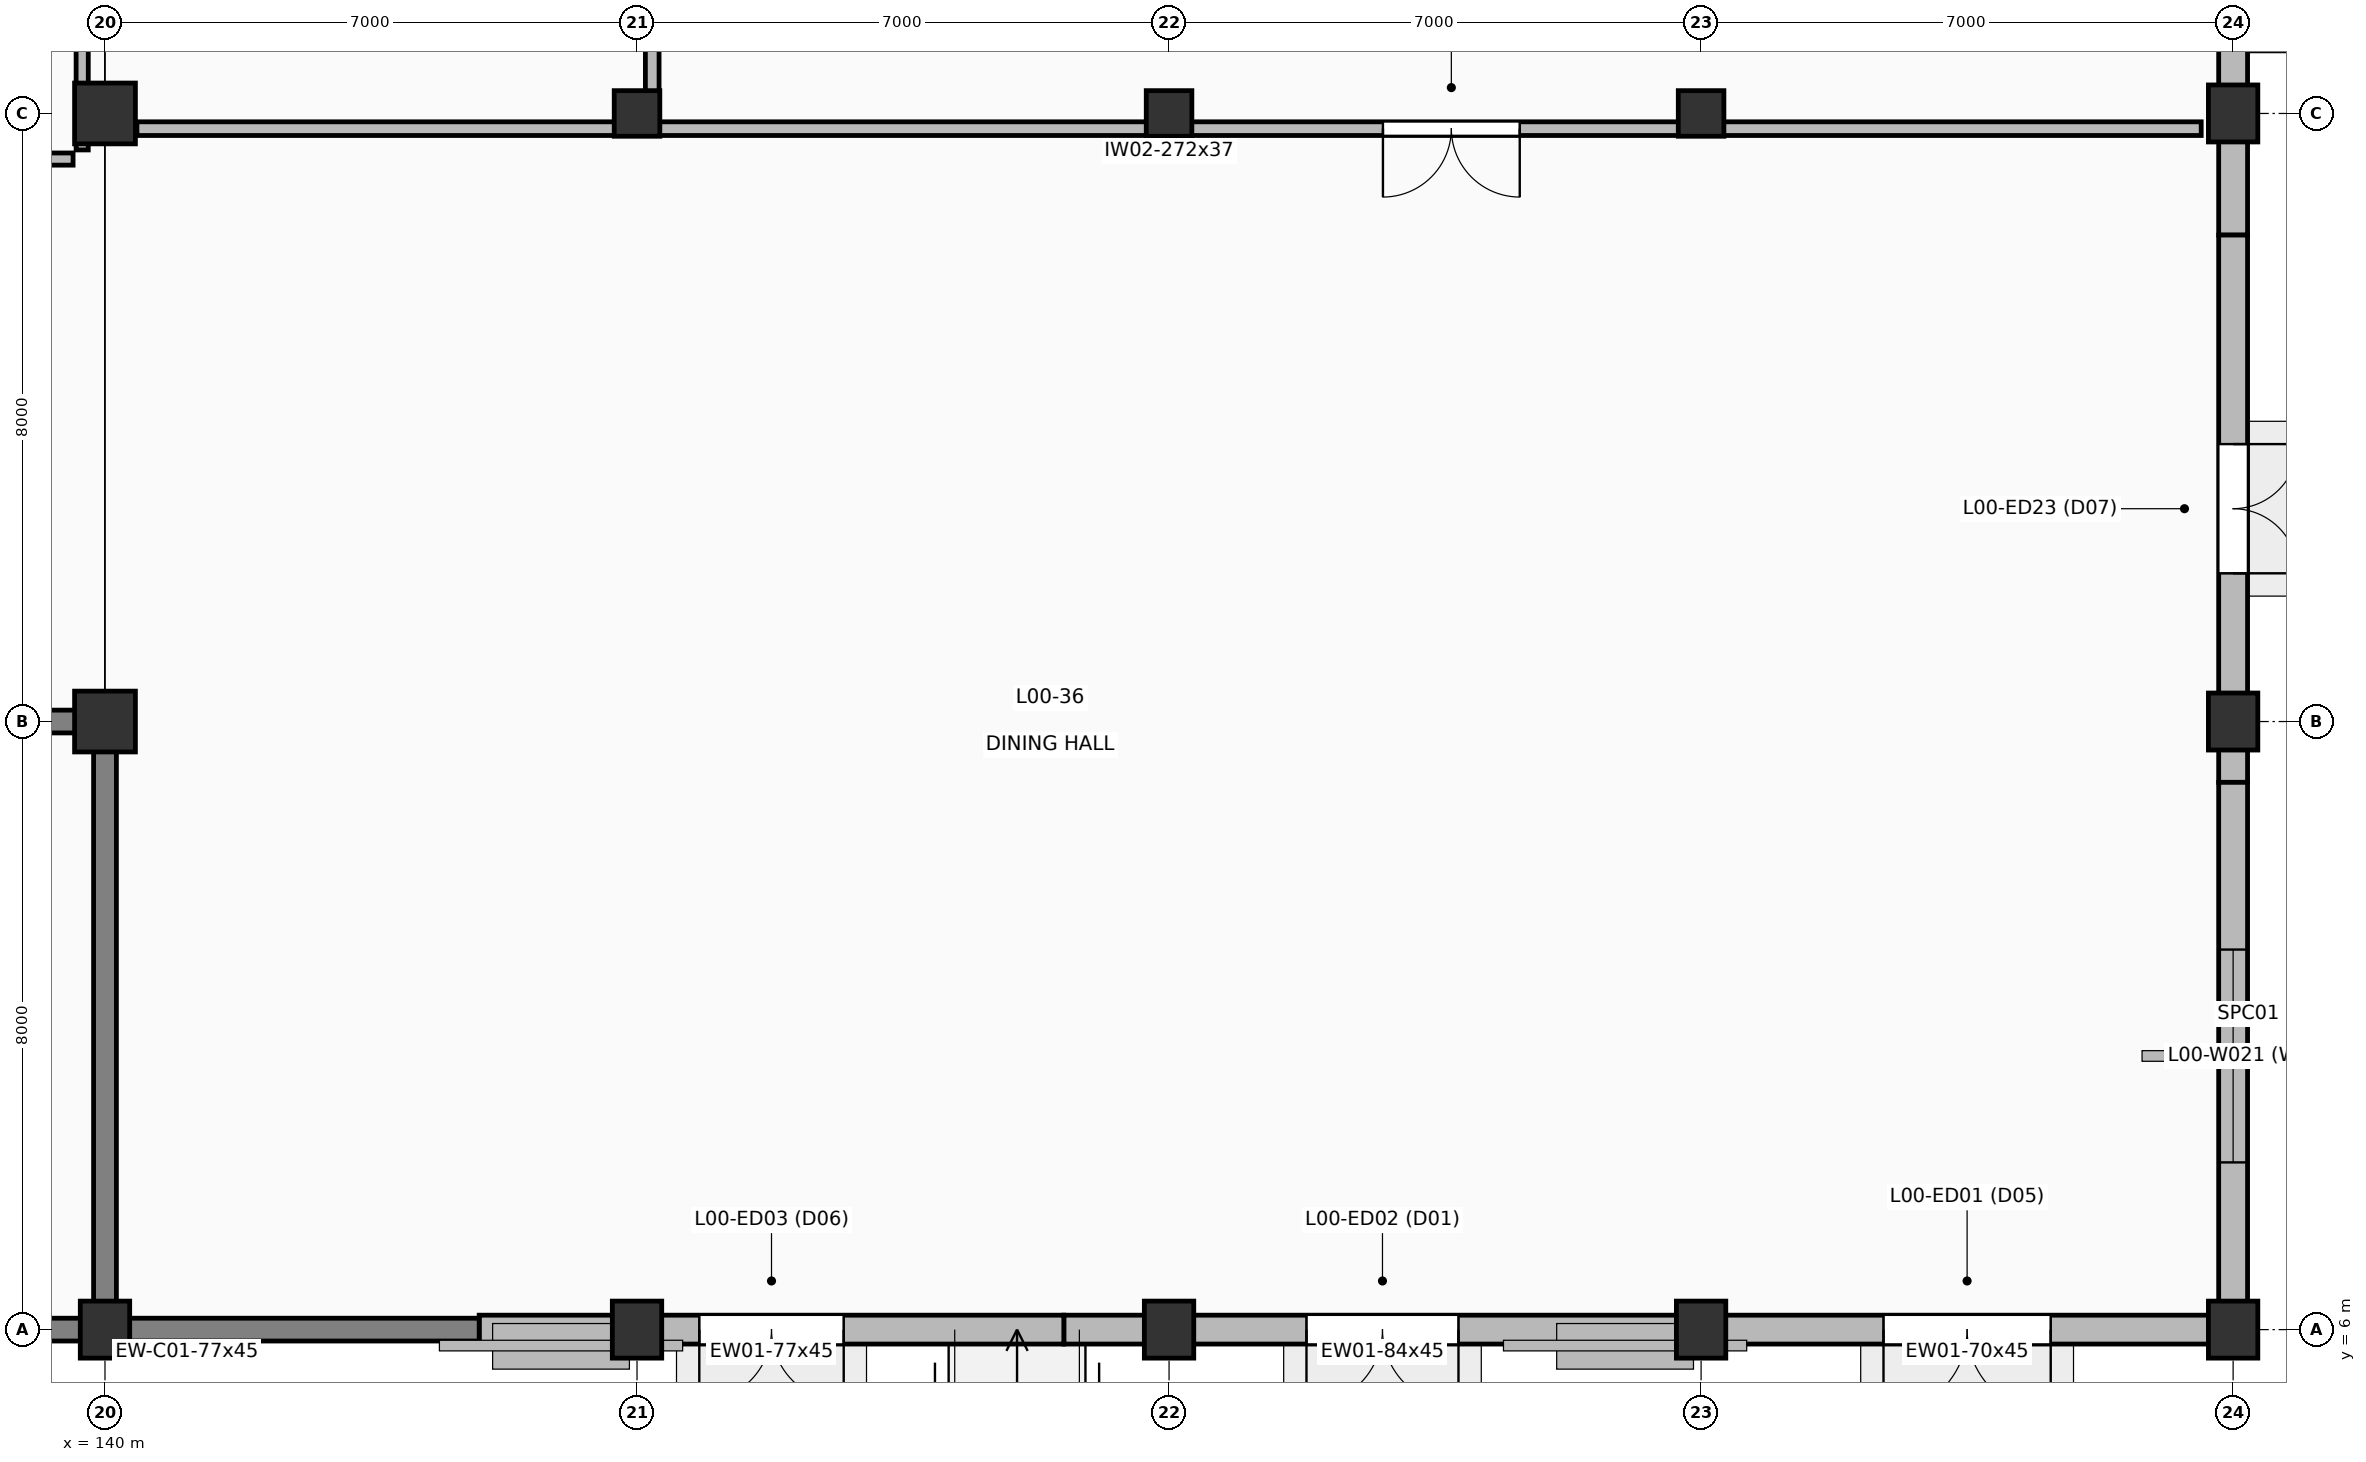
"""IFC4 building model, lengths in metres.
Left out: names, types, materials, properties, quantities, classifications, styles, units other than length and angle.
Written with IfcOpenShell. Run it as: python <this file> out.ifc"""

import sys

from ifc_helpers import new_model, si_unit, direction, frame, frame_2d, origin, origin_2d, place, context, subcontext, project, spatial, rectangle, extrude, element, fill, save


model = new_model("IFC4")
c1 = context("Model", 3, precision=1e-05, world=origin(), true_north=direction((0.0, 1.0)))
c2 = subcontext(c1, "Body", "Model", "MODEL_VIEW")
j1 = project(units=[si_unit("LENGTHUNIT", "METRE"), si_unit("PLANEANGLEUNIT", "RADIAN")], contexts=[c1])
p1 = place(None, origin())
s1 = spatial("IfcSite", under=j1, at=p1, CompositionType="ELEMENT")
p2 = place(p1, origin())
s2 = spatial("IfcBuilding", under=s1, at=p2, CompositionType="ELEMENT")
p3 = place(p2, origin())
s3 = spatial("IfcBuildingStorey", under=s2, at=p3, CompositionType="ELEMENT", Elevation=0.0)
p4 = place(p3, frame((140.0, 6.0, 0.0), z_axis=(0.0, 0.0, 1.0), x_axis=(1.0, 0.0, 0.0)))
e1 = element("IfcColumn", 1, at=p4, inside=s3, PredefinedType="PILASTER", context=c2, shape_type="SweptSolid", body=[
    extrude(rectangle(XDim=0.65, YDim=0.75, at=origin_2d()), origin(), (0.0, 0.0, 1.0), 5.4),
])
for number, where, z_axis, x_axis in (
    (2, (140.0, 14.0, 0.0), (0.0, 0.0, 1.0), (1.0, 0.0, 0.0)),
    (3, (140.0, 22.0, 0.0), (0.0, 0.0, 1.0), (1.0, 0.0, 0.0)),
):
    element("IfcColumn", number, at=place(p3, frame(where, z_axis=z_axis, x_axis=x_axis)), inside=s3, PredefinedType="COLUMN", context=c2, shape_type="SweptSolid", body=[
        extrude(rectangle(XDim=0.8, YDim=0.8, at=origin_2d()), origin(), (0.0, 0.0, 1.0), 5.4),
    ])
p5 = place(p3, frame((147.0, 6.0, 0.0), z_axis=(0.0, 0.0, 1.0), x_axis=(1.0, 0.0, 0.0)))
e4 = element("IfcColumn", 4, at=p5, inside=s3, PredefinedType="PILASTER", context=c2, shape_type="SweptSolid", body=[
    extrude(rectangle(XDim=0.65, YDim=0.75, at=origin_2d()), origin(), (0.0, 0.0, 1.0), 5.4),
])
p6 = place(p3, frame((147.0, 22.0, 0.0), z_axis=(0.0, 0.0, 1.0), x_axis=(1.0, 0.0, 0.0)))
e5 = element("IfcColumn", 5, at=p6, inside=s3, PredefinedType="COLUMN", context=c2, shape_type="SweptSolid", body=[
    extrude(rectangle(XDim=0.6, YDim=0.6, at=origin_2d()), origin(), (0.0, 0.0, 1.0), 5.4),
])
p7 = place(p3, frame((154.0, 6.0, 0.0), z_axis=(0.0, 0.0, 1.0), x_axis=(1.0, 0.0, 0.0)))
e6 = element("IfcColumn", 6, at=p7, inside=s3, PredefinedType="PILASTER", context=c2, shape_type="SweptSolid", body=[
    extrude(rectangle(XDim=0.65, YDim=0.75, at=origin_2d()), origin(), (0.0, 0.0, 1.0), 5.4),
])
p8 = place(p3, frame((154.0, 22.0, 0.0), z_axis=(0.0, 0.0, 1.0), x_axis=(1.0, 0.0, 0.0)))
e7 = element("IfcColumn", 7, at=p8, inside=s3, PredefinedType="COLUMN", context=c2, shape_type="SweptSolid", body=[
    extrude(rectangle(XDim=0.6, YDim=0.6, at=origin_2d()), origin(), (0.0, 0.0, 1.0), 5.4),
])
p9 = place(p3, frame((161.0, 6.0, 0.0), z_axis=(0.0, 0.0, 1.0), x_axis=(1.0, 0.0, 0.0)))
e8 = element("IfcColumn", 8, at=p9, inside=s3, PredefinedType="PILASTER", context=c2, shape_type="SweptSolid", body=[
    extrude(rectangle(XDim=0.65, YDim=0.75, at=origin_2d()), origin(), (0.0, 0.0, 1.0), 5.4),
])
p10 = place(p3, frame((161.0, 22.0, 0.0), z_axis=(0.0, 0.0, 1.0), x_axis=(1.0, 0.0, 0.0)))
e9 = element("IfcColumn", 9, at=p10, inside=s3, PredefinedType="COLUMN", context=c2, shape_type="SweptSolid", body=[
    extrude(rectangle(XDim=0.6, YDim=0.6, at=origin_2d()), origin(), (0.0, 0.0, 1.0), 5.4),
])
for number, where, z_axis, x_axis in (
    (10, (168.0, 6.0, 0.0), (0.0, 0.0, 1.0), (1.0, 0.0, 0.0)),
    (11, (168.0, 14.0, 0.0), (0.0, 0.0, 1.0), (1.0, 0.0, 0.0)),
    (12, (168.0, 22.0, 0.0), (0.0, 0.0, 1.0), (1.0, 0.0, 0.0)),
):
    element("IfcColumn", number, at=place(p3, frame(where, z_axis=z_axis, x_axis=x_axis)), inside=s3, PredefinedType="PILASTER", context=c2, shape_type="SweptSolid", body=[
        extrude(rectangle(XDim=0.65, YDim=0.75, at=origin_2d()), origin(), (0.0, 0.0, 1.0), 5.4),
    ])
p11 = place(p3, frame((168.0, 6.0, 0.0), z_axis=(0.0, 0.0, 1.0), x_axis=(-1.0, 0.0, 0.0)))
e13 = element("IfcWall", 13, at=p11, inside=s3, PredefinedType="SOLIDWALL", context=c2, shape_type="SweptSolid", body=[
    extrude(rectangle(XDim=7.0, YDim=0.38, at=frame_2d((3.5, 0.0))), origin(), (0.0, 0.0, 1.0), 4.495),
])
p12 = place(p11, frame((2.4, 0.0, 0.0)))
e14 = element("IfcOpeningElement", 14, at=p12, cuts=e13, PredefinedType="OPENING", context=c2, shape_type="SweptSolid", body=[
    extrude(rectangle(XDim=2.2, YDim=2.45, at=frame_2d((1.1, 1.225))), frame((0.0, 0.2, 0.0), z_axis=(0.0, -1.0, 0.0), x_axis=(1.0, 0.0, 0.0)), (0.0, 0.0, 1.0), 0.4),
])
p13 = place(p3, frame((161.0, 6.0, 0.0), z_axis=(0.0, 0.0, 1.0), x_axis=(-1.0, 0.0, 0.0)))
e15 = element("IfcWall", 15, at=p13, inside=s3, PredefinedType="SOLIDWALL", context=c2, shape_type="SweptSolid", body=[
    extrude(rectangle(XDim=8.385, YDim=0.38, at=frame_2d((4.192, 0.0))), origin(), (0.0, 0.0, 1.0), 4.495),
])
p14 = place(p13, frame((3.192, 0.0, 0.0)))
e16 = element("IfcOpeningElement", 16, at=p14, cuts=e15, PredefinedType="OPENING", context=c2, shape_type="SweptSolid", body=[
    extrude(rectangle(XDim=2.0, YDim=2.4, at=frame_2d((1.0, 1.2))), frame((0.0, 0.2, 0.0), z_axis=(0.0, -1.0, 0.0), x_axis=(1.0, 0.0, 0.0)), (0.0, 0.0, 1.0), 0.4),
])
p15 = place(p3, frame((152.615, 6.0, 0.0), z_axis=(0.0, 0.0, 1.0), x_axis=(-1.0, 0.0, 0.0)))
e17 = element("IfcWall", 17, at=p15, inside=s3, PredefinedType="SOLIDWALL", context=c2, shape_type="SweptSolid", body=[
    extrude(rectangle(XDim=7.692, YDim=0.38, at=frame_2d((3.846, 0.0))), origin(), (0.0, 0.0, 1.0), 4.495),
])
p16 = place(p15, frame((2.896, 0.0, 0.0)))
e18 = element("IfcOpeningElement", 18, at=p16, cuts=e17, PredefinedType="OPENING", context=c2, shape_type="SweptSolid", body=[
    extrude(rectangle(XDim=1.9, YDim=2.35, at=frame_2d((0.95, 1.175))), frame((0.0, 0.2, 0.0), z_axis=(0.0, -1.0, 0.0), x_axis=(1.0, 0.0, 0.0)), (0.0, 0.0, 1.0), 0.4),
])
p17 = place(p3, frame((144.923, 6.0, 0.0), z_axis=(0.0, 0.0, 1.0), x_axis=(-1.0, 0.0, 0.0)))
e19 = element("IfcWall", 19, at=p17, inside=s3, PredefinedType="SOLIDWALL", context=c2, shape_type="SweptSolid", body=[
    extrude(rectangle(XDim=7.692, YDim=0.3, at=frame_2d((3.846, 0.0))), origin(), (0.0, 0.0, 1.0), 5.4),
])
p18 = place(p3, frame((168.0, 27.6, 0.0), z_axis=(0.0, 0.0, 1.0), x_axis=(0.0, -1.0, 0.0)))
e20 = element("IfcWall", 20, at=p18, inside=s3, PredefinedType="SOLIDWALL", context=c2, shape_type="SweptSolid", body=[
    extrude(rectangle(XDim=7.2, YDim=0.38, at=frame_2d((3.6, 0.0))), origin(), (0.0, 0.0, 1.0), 4.445),
])
p19 = place(p18, frame((2.7, 0.0, 0.0)))
e21 = element("IfcOpeningElement", 21, at=p19, cuts=e20, PredefinedType="OPENING", context=c2, shape_type="SweptSolid", body=[
    extrude(rectangle(XDim=1.8, YDim=2.3, at=frame_2d((0.9, 1.15))), frame((0.0, 0.2, 0.0), z_axis=(0.0, -1.0, 0.0), x_axis=(1.0, 0.0, 0.0)), (0.0, 0.0, 1.0), 0.4),
])
p20 = place(p3, frame((168.0, 20.4, 0.0), z_axis=(0.0, 0.0, 1.0), x_axis=(0.0, -1.0, 0.0)))
e22 = element("IfcWall", 22, at=p20, inside=s3, PredefinedType="SOLIDWALL", context=c2, shape_type="SweptSolid", body=[
    extrude(rectangle(XDim=7.2, YDim=0.38, at=frame_2d((3.6, 0.0))), origin(), (0.0, 0.0, 1.0), 4.445),
])
p21 = place(p20, frame((2.75, 0.0, 0.0)))
e23 = element("IfcOpeningElement", 23, at=p21, cuts=e22, PredefinedType="OPENING", context=c2, shape_type="SweptSolid", body=[
    extrude(rectangle(XDim=1.7, YDim=2.25, at=frame_2d((0.85, 1.125))), frame((0.0, 0.2, 0.0), z_axis=(0.0, -1.0, 0.0), x_axis=(1.0, 0.0, 0.0)), (0.0, 0.0, 1.0), 0.4),
])
p22 = place(p3, frame((168.0, 13.2, 0.0), z_axis=(0.0, 0.0, 1.0), x_axis=(0.0, -1.0, 0.0)))
e24 = element("IfcWall", 24, at=p22, inside=s3, PredefinedType="SOLIDWALL", context=c2, shape_type="SweptSolid", body=[
    extrude(rectangle(XDim=7.2, YDim=0.38, at=frame_2d((3.6, 0.0))), origin(), (0.0, 0.0, 1.0), 4.445),
])
p23 = place(p22, frame((2.2, 0.0, 0.8)))
e25 = element("IfcOpeningElement", 25, at=p23, cuts=e24, PredefinedType="OPENING", context=c2, shape_type="SweptSolid", body=[
    extrude(rectangle(XDim=2.8, YDim=2.9, at=frame_2d((1.4, 1.45))), frame((0.0, 0.2, 0.0), z_axis=(0.0, -1.0, 0.0), x_axis=(1.0, 0.0, 0.0)), (0.0, 0.0, 1.0), 0.4),
])
p24 = place(p3, frame((132.0, 14.0, 0.0), z_axis=(0.0, 0.0, 1.0), x_axis=(1.0, 0.0, 0.0)))
e26 = element("IfcWall", 26, at=p24, inside=s3, PredefinedType="SHEAR", context=c2, shape_type="SweptSolid", body=[
    extrude(rectangle(XDim=8.0, YDim=0.3, at=frame_2d((4.0, 0.0))), origin(), (0.0, 0.0, 1.0), 5.4),
])
p25 = place(p24, frame((1.45, 0.0, 0.0)))
e27 = element("IfcOpeningElement", 27, at=p25, cuts=e26, PredefinedType="OPENING", context=c2, shape_type="SweptSolid", body=[
    extrude(rectangle(XDim=1.5, YDim=2.2, at=frame_2d((0.75, 1.1))), frame((0.0, 0.16, 0.0), z_axis=(0.0, -1.0, 0.0), x_axis=(1.0, 0.0, 0.0)), (0.0, 0.0, 1.0), 0.32),
])
p26 = place(p3, frame((140.0, 14.0, 0.0), z_axis=(0.0, 0.0, 1.0), x_axis=(0.0, -1.0, 0.0)))
e28 = element("IfcWall", 28, at=p26, inside=s3, PredefinedType="SHEAR", context=c2, shape_type="SweptSolid", body=[
    extrude(rectangle(XDim=8.0, YDim=0.3, at=frame_2d((4.0, 0.0))), origin(), (0.0, 0.0, 1.0), 5.4),
])
p27 = place(p3, frame((132.32, 21.4, 0.0), z_axis=(0.0, 0.0, 1.0), x_axis=(1.0, 0.0, 0.0)))
e29 = element("IfcWall", 29, at=p27, inside=s3, PredefinedType="PLUMBINGWALL", context=c2, shape_type="SweptSolid", body=[
    extrude(rectangle(XDim=7.26, YDim=0.16, at=frame_2d((3.63, 0.0))), origin(), (0.0, 0.0, 1.0), 5.16),
])
p28 = place(p27, frame((3.155, 0.0, 0.0)))
e30 = element("IfcOpeningElement", 30, at=p28, cuts=e29, PredefinedType="OPENING", context=c2, shape_type="SweptSolid", body=[
    extrude(rectangle(XDim=0.95, YDim=2.15, at=frame_2d((0.475, 1.075))), frame((0.0, 0.09, 0.0), z_axis=(0.0, -1.0, 0.0), x_axis=(1.0, 0.0, 0.0)), (0.0, 0.0, 1.0), 0.18),
])
p29 = place(p3, frame((139.7, 21.52, 0.0), z_axis=(0.0, 0.0, 1.0), x_axis=(0.0, 1.0, 0.0)))
e31 = element("IfcWall", 31, at=p29, inside=s3, PredefinedType="PLUMBINGWALL", context=c2, shape_type="SweptSolid", body=[
    extrude(rectangle(XDim=8.06, YDim=0.16, at=frame_2d((4.03, 0.0))), origin(), (0.0, 0.0, 1.0), 4.445),
])
p30 = place(p3, frame((167.58, 21.8, 0.0), z_axis=(0.0, 0.0, 1.0), x_axis=(-1.0, 0.0, 0.0)))
e32 = element("IfcWall", 32, at=p30, inside=s3, PredefinedType="PARTITIONING", context=c2, shape_type="SweptSolid", body=[
    extrude(rectangle(XDim=27.16, YDim=0.18, at=frame_2d((13.58, 0.0))), origin(), (0.0, 0.0, 1.0), 3.745),
])
p31 = place(p30, frame((8.966, 0.0, 0.0)))
e33 = element("IfcOpeningElement", 33, at=p31, cuts=e32, PredefinedType="OPENING", context=c2, shape_type="SweptSolid", body=[
    extrude(rectangle(XDim=1.8, YDim=2.3, at=frame_2d((0.9, 1.15))), frame((0.0, 0.1, 0.0), z_axis=(0.0, -1.0, 0.0), x_axis=(1.0, 0.0, 0.0)), (0.0, 0.0, 1.0), 0.2),
])
p32 = place(p3, frame((147.2, 29.68, 0.0), z_axis=(0.0, 0.0, 1.0), x_axis=(0.0, -1.0, 0.0)))
e34 = element("IfcWall", 34, at=p32, inside=s3, PredefinedType="PARTITIONING", context=c2, shape_type="SweptSolid", body=[
    extrude(rectangle(XDim=7.56, YDim=0.18, at=frame_2d((3.78, 0.0))), origin(), (0.0, 0.0, 1.0), 4.445),
])
p33 = place(p12, origin())
e35 = element("IfcDoor", 35, at=p33, inside=s3, OperationType="DOUBLE_DOOR_SINGLE_SWING", PredefinedType="DOOR", context=c2, shape_type="SweptSolid", body=[
    extrude(rectangle(XDim=2.2, YDim=2.45, at=frame_2d((1.1, 1.225))), frame((0.0, 0.025, 0.0), z_axis=(0.0, -1.0, 0.0), x_axis=(1.0, 0.0, 0.0)), (0.0, 0.0, 1.0), 0.05),
])
fill(e14, e35)
p34 = place(p14, origin())
e36 = element("IfcDoor", 36, at=p34, inside=s3, OperationType="DOUBLE_DOOR_SINGLE_SWING", PredefinedType="DOOR", context=c2, shape_type="SweptSolid", body=[
    extrude(rectangle(XDim=2.0, YDim=2.4, at=frame_2d((1.0, 1.2))), frame((0.0, 0.025, 0.0), z_axis=(0.0, -1.0, 0.0), x_axis=(1.0, 0.0, 0.0)), (0.0, 0.0, 1.0), 0.05),
])
fill(e16, e36)
p35 = place(p16, origin())
e37 = element("IfcDoor", 37, at=p35, inside=s3, OperationType="DOUBLE_DOOR_SINGLE_SWING", PredefinedType="DOOR", context=c2, shape_type="SweptSolid", body=[
    extrude(rectangle(XDim=1.9, YDim=2.35, at=frame_2d((0.95, 1.175))), frame((0.0, 0.025, 0.0), z_axis=(0.0, -1.0, 0.0), x_axis=(1.0, 0.0, 0.0)), (0.0, 0.0, 1.0), 0.05),
])
fill(e18, e37)
p36 = place(p21, origin())
e38 = element("IfcDoor", 38, at=p36, inside=s3, OperationType="DOUBLE_DOOR_SINGLE_SWING", PredefinedType="DOOR", context=c2, shape_type="SweptSolid", body=[
    extrude(rectangle(XDim=1.7, YDim=2.25, at=frame_2d((0.85, 1.125))), frame((0.0, 0.025, 0.0), z_axis=(0.0, -1.0, 0.0), x_axis=(1.0, 0.0, 0.0)), (0.0, 0.0, 1.0), 0.05),
])
fill(e23, e38)
p37 = place(p23, origin())
e39 = element("IfcWindow", 39, at=p37, inside=s3, PartitioningType="TRIPLE_PANEL_VERTICAL", PredefinedType="WINDOW", context=c2, shape_type="SweptSolid", body=[
    extrude(rectangle(XDim=2.8, YDim=2.9, at=frame_2d((1.4, 1.45))), frame((0.0, 0.03, 0.0), z_axis=(0.0, -1.0, 0.0), x_axis=(1.0, 0.0, 0.0)), (0.0, 0.0, 1.0), 0.06),
])
fill(e25, e39)
p38 = place(p31, origin())
e40 = element("IfcDoor", 40, at=p38, inside=s3, OperationType="DOUBLE_DOOR_SINGLE_SWING", PredefinedType="DOOR", context=c2, shape_type="SweptSolid", body=[
    extrude(rectangle(XDim=1.8, YDim=2.3, at=frame_2d((0.9, 1.15))), frame((0.0, 0.025, 0.0), z_axis=(0.0, -1.0, 0.0), x_axis=(1.0, 0.0, 0.0)), (0.0, 0.0, 1.0), 0.05),
])
fill(e33, e40)
save(model, sys.argv[1])
